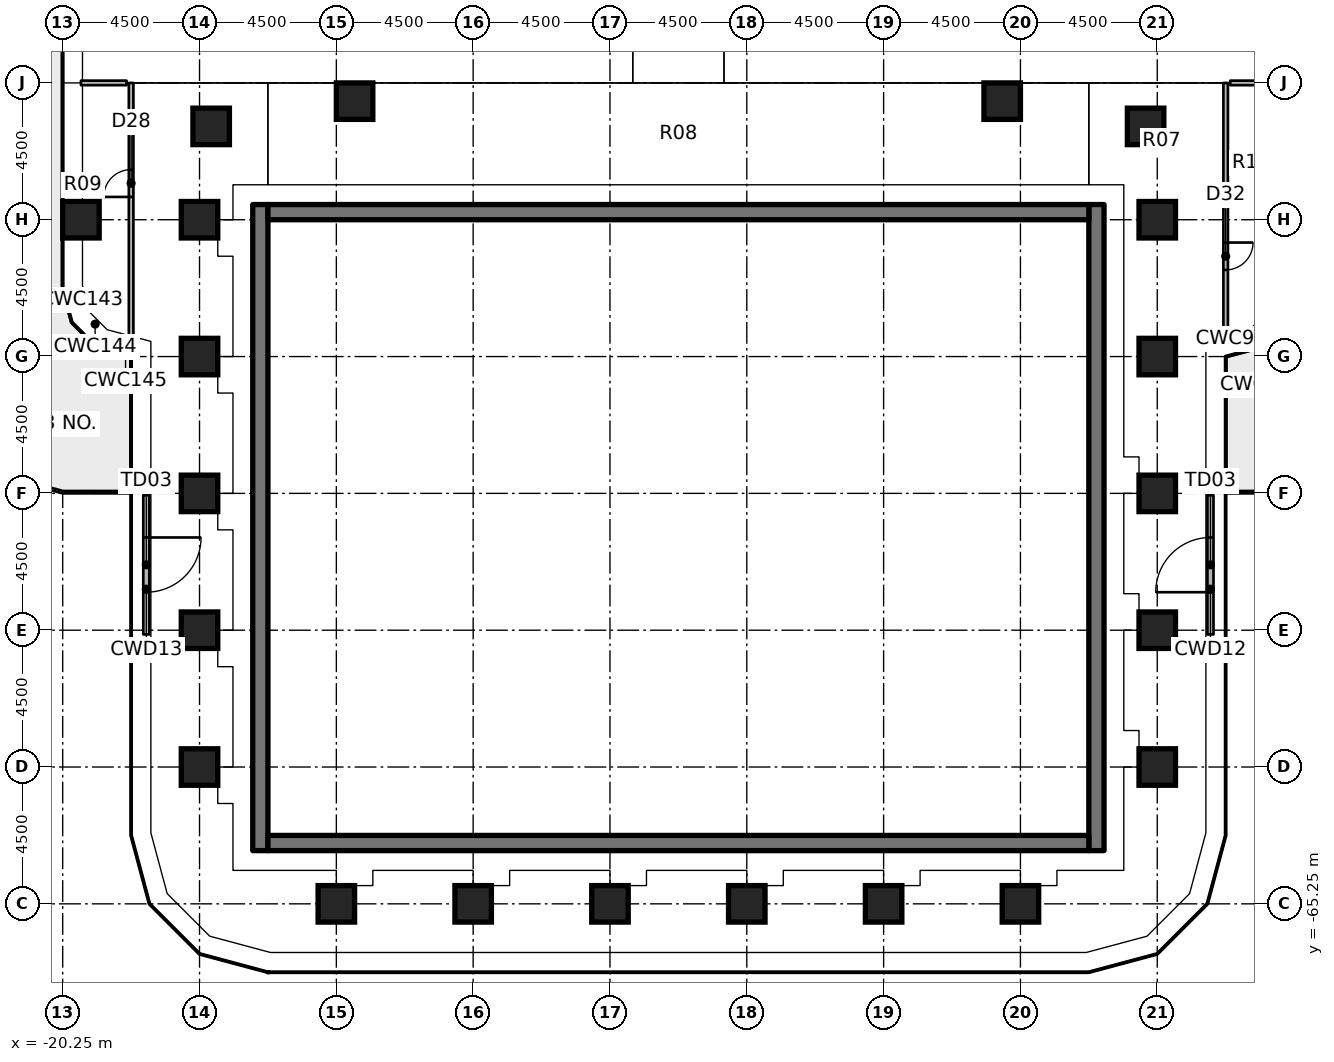
"""IFC4 building model, lengths in metres.
Left out: names, types, materials, properties, quantities, classifications, styles, units other than length and angle.
Written with IfcOpenShell. Run it as: python <this file> out.ifc"""

import sys

from ifc_helpers import new_model, si_unit, direction, frame, frame_2d, origin, origin_2d, place, context, subcontext, project, spatial, rectangle, extrude, element, fill, save


model = new_model("IFC4")
c1 = context("Model", 3, precision=1e-05, world=origin(), true_north=direction((0.0, 1.0)))
c2 = subcontext(c1, "Body", "Model", "MODEL_VIEW")
j1 = project(units=[si_unit("LENGTHUNIT", "METRE"), si_unit("PLANEANGLEUNIT", "RADIAN")], contexts=[c1])
p1 = place(None, origin())
s1 = spatial("IfcSite", under=j1, at=p1, CompositionType="ELEMENT")
p2 = place(p1, origin())
s2 = spatial("IfcBuilding", under=s1, at=p2, CompositionType="ELEMENT")
p3 = place(p2, frame((0.0, 0.0, 12.0)))
s3 = spatial("IfcBuildingStorey", under=s2, at=p3, CompositionType="ELEMENT", Elevation=12.0)
for number, where, z_axis, x_axis in (
    (1, (-19.65, -42.75, 0.0), (0.0, 0.0, 1.0), (1.0, 0.0, 0.0)),
    (2, (-15.75, -60.75, 0.0), (0.0, 0.0, 1.0), (1.0, 0.0, 0.0)),
    (3, (-15.75, -56.25, 0.0), (0.0, 0.0, 1.0), (1.0, 0.0, 0.0)),
    (4, (-15.75, -51.75, 0.0), (0.0, 0.0, 1.0), (1.0, 0.0, 0.0)),
    (5, (-15.75, -47.25, 0.0), (0.0, 0.0, 1.0), (1.0, 0.0, 0.0)),
    (6, (-15.75, -42.75, 0.0), (0.0, 0.0, 1.0), (1.0, 0.0, 0.0)),
    (7, (-15.367, -39.68, 0.0), (0.0, 0.0, 1.0), (1.0, 0.0, 0.0)),
    (8, (-11.25, -65.25, 0.0), (0.0, 0.0, 1.0), (1.0, 0.0, 0.0)),
    (9, (-10.65, -38.85, 0.0), (0.0, 0.0, 1.0), (1.0, 0.0, 0.0)),
    (10, (-6.75, -65.25, 0.0), (0.0, 0.0, 1.0), (1.0, 0.0, 0.0)),
    (11, (-2.25, -65.25, 0.0), (0.0, 0.0, 1.0), (1.0, 0.0, 0.0)),
    (12, (2.25, -65.25, 0.0), (0.0, 0.0, 1.0), (1.0, 0.0, 0.0)),
    (13, (6.75, -65.25, 0.0), (0.0, 0.0, 1.0), (1.0, 0.0, 0.0)),
    (14, (11.25, -65.25, 0.0), (0.0, 0.0, 1.0), (1.0, 0.0, 0.0)),
    (15, (10.65, -38.85, 0.0), (0.0, 0.0, 1.0), (1.0, 0.0, 0.0)),
    (16, (15.75, -60.75, 0.0), (0.0, 0.0, 1.0), (1.0, 0.0, 0.0)),
    (17, (15.75, -56.25, 0.0), (0.0, 0.0, 1.0), (1.0, 0.0, 0.0)),
    (18, (15.75, -51.75, 0.0), (0.0, 0.0, 1.0), (1.0, 0.0, 0.0)),
    (19, (15.75, -47.25, 0.0), (0.0, 0.0, 1.0), (1.0, 0.0, 0.0)),
    (20, (15.75, -42.75, 0.0), (0.0, 0.0, 1.0), (1.0, 0.0, 0.0)),
    (21, (15.367, -39.68, 0.0), (0.0, 0.0, 1.0), (1.0, 0.0, 0.0)),
):
    element("IfcColumn", number, at=place(p3, frame(where, z_axis=z_axis, x_axis=x_axis)), inside=s3, PredefinedType="COLUMN", context=c2, shape_type="SweptSolid", body=[
        extrude(rectangle(XDim=1.2, YDim=1.2, at=origin_2d()), origin(), (0.0, 0.0, 1.0), 4.55),
    ])
for number, where, z_axis, x_axis in (
    (22, (-13.75, -63.5, 0.0), (0.0, 0.0, 1.0), (0.0, 1.0, 0.0)),
    (23, (13.75, -63.5, 0.0), (0.0, 0.0, 1.0), (0.0, 1.0, 0.0)),
):
    element("IfcWall", number, at=place(p3, frame(where, z_axis=z_axis, x_axis=x_axis)), inside=s3, PredefinedType="SOLIDWALL", context=c2, shape_type="SweptSolid", body=[
        extrude(rectangle(XDim=21.25, YDim=0.5, at=frame_2d((10.625, 0.0))), origin(), (0.0, 0.0, 1.0), 5.0),
    ])
for number, where, z_axis, x_axis in (
    (24, (-13.5, -63.25, 0.0), (0.0, 0.0, 1.0), (1.0, 0.0, 0.0)),
    (25, (-13.5, -42.5, 0.0), (0.0, 0.0, 1.0), (1.0, 0.0, 0.0)),
):
    element("IfcWall", number, at=place(p3, frame(where, z_axis=z_axis, x_axis=x_axis)), inside=s3, PredefinedType="SOLIDWALL", context=c2, shape_type="SweptSolid", body=[
        extrude(rectangle(XDim=27.0, YDim=0.5, at=frame_2d((13.5, 0.0))), origin(), (0.0, 0.0, 1.0), 5.0),
    ])
p4 = place(p3, frame((17.5, -56.39, 0.0), z_axis=(0.0, 0.0, 1.0), x_axis=(0.0, 1.0, 0.0)))
e26 = element("IfcWall", 26, at=p4, inside=s3, PredefinedType="SOLIDWALL", context=c2, shape_type="SweptSolid", body=[
    extrude(rectangle(XDim=4.58, YDim=0.2, at=frame_2d((2.29, 0.0))), origin(), (0.0, 0.0, 1.0), 4.55),
])
p5 = place(p4, frame((1.39, 0.0, 0.0)))
e27 = element("IfcOpeningElement", 27, at=p5, cuts=e26, PredefinedType="OPENING", context=c2, shape_type="SweptSolid", body=[
    extrude(rectangle(XDim=1.8, YDim=2.4, at=frame_2d((0.9, 1.2))), frame((0.0, 0.11, 0.0), z_axis=(0.0, -1.0, 0.0), x_axis=(1.0, 0.0, 0.0)), (0.0, 0.0, 1.0), 0.22),
])
p6 = place(p3, frame((-17.5, -51.81, 0.0), z_axis=(0.0, 0.0, 1.0), x_axis=(0.0, -1.0, 0.0)))
e28 = element("IfcWall", 28, at=p6, inside=s3, PredefinedType="SOLIDWALL", context=c2, shape_type="SweptSolid", body=[
    extrude(rectangle(XDim=4.58, YDim=0.2, at=frame_2d((2.29, 0.0))), origin(), (0.0, 0.0, 1.0), 4.55),
])
p7 = place(p6, frame((1.39, 0.0, 0.0)))
e29 = element("IfcOpeningElement", 29, at=p7, cuts=e28, PredefinedType="OPENING", context=c2, shape_type="SweptSolid", body=[
    extrude(rectangle(XDim=1.8, YDim=2.4, at=frame_2d((0.9, 1.2))), frame((0.0, 0.11, 0.0), z_axis=(0.0, -1.0, 0.0), x_axis=(1.0, 0.0, 0.0)), (0.0, 0.0, 1.0), 0.22),
])
p8 = place(p3, frame((-18.0, -46.63, 0.0), z_axis=(0.0, 0.0, 1.0), x_axis=(0.0, 1.0, 0.0)))
e30 = element("IfcWall", 30, at=p8, inside=s3, PredefinedType="PARTITIONING", context=c2, shape_type="SweptSolid", body=[
    extrude(rectangle(XDim=8.38, YDim=0.15, at=frame_2d((4.19, 0.0))), origin(), (0.0, 0.0, 1.0), 4.55),
])
p9 = place(p8, frame((4.63, 0.0, 0.0)))
e31 = element("IfcOpeningElement", 31, at=p9, cuts=e30, PredefinedType="OPENING", context=c2, shape_type="SweptSolid", body=[
    extrude(rectangle(XDim=0.9, YDim=2.1, at=frame_2d((0.45, 1.05))), frame((0.0, 0.085, 0.0), z_axis=(0.0, -1.0, 0.0), x_axis=(1.0, 0.0, 0.0)), (0.0, 0.0, 1.0), 0.17),
])
p10 = place(p3, frame((18.0, -38.25, 0.0), z_axis=(0.0, 0.0, 1.0), x_axis=(0.0, -1.0, 0.0)))
e32 = element("IfcWall", 32, at=p10, inside=s3, PredefinedType="PARTITIONING", context=c2, shape_type="SweptSolid", body=[
    extrude(rectangle(XDim=8.38, YDim=0.15, at=frame_2d((4.19, 0.0))), origin(), (0.0, 0.0, 1.0), 4.55),
])
p11 = place(p10, frame((5.25, 0.0, 0.0)))
e33 = element("IfcOpeningElement", 33, at=p11, cuts=e32, PredefinedType="OPENING", context=c2, shape_type="SweptSolid", body=[
    extrude(rectangle(XDim=0.9, YDim=2.1, at=frame_2d((0.45, 1.05))), frame((0.0, 0.085, 0.0), z_axis=(0.0, -1.0, 0.0), x_axis=(1.0, 0.0, 0.0)), (0.0, 0.0, 1.0), 0.17),
])
for number, where, z_axis, x_axis in (
    (34, (-19.65, -38.25, 0.0), (0.0, 0.0, 1.0), (1.0, 0.0, 0.0)),
    (35, (18.15, -38.25, 0.0), (0.0, 0.0, 1.0), (1.0, 0.0, 0.0)),
):
    element("IfcWall", number, at=place(p3, frame(where, z_axis=z_axis, x_axis=x_axis)), inside=s3, PredefinedType="PARTITIONING", context=c2, shape_type="SweptSolid", body=[
        extrude(rectangle(XDim=1.5, YDim=0.15, at=frame_2d((0.75, 0.0))), origin(), (0.0, 0.0, 1.0), 4.55),
    ])
p12 = place(p5, origin())
e36 = element("IfcDoor", 36, at=p12, inside=s3, OperationType="SINGLE_SWING_LEFT", PredefinedType="DOOR", context=c2, shape_type="SweptSolid", body=[
    extrude(rectangle(XDim=1.8, YDim=2.4, at=frame_2d((0.9, 1.2))), frame((0.0, 0.025, 0.0), z_axis=(0.0, -1.0, 0.0), x_axis=(1.0, 0.0, 0.0)), (0.0, 0.0, 1.0), 0.05),
])
fill(e27, e36)
p13 = place(p7, origin())
e37 = element("IfcDoor", 37, at=p13, inside=s3, OperationType="SINGLE_SWING_LEFT", PredefinedType="DOOR", context=c2, shape_type="SweptSolid", body=[
    extrude(rectangle(XDim=1.8, YDim=2.4, at=frame_2d((0.9, 1.2))), frame((0.0, 0.025, 0.0), z_axis=(0.0, -1.0, 0.0), x_axis=(1.0, 0.0, 0.0)), (0.0, 0.0, 1.0), 0.05),
])
fill(e29, e37)
p14 = place(p9, origin())
e38 = element("IfcDoor", 38, at=p14, inside=s3, OperationType="SINGLE_SWING_LEFT", PredefinedType="DOOR", context=c2, shape_type="SweptSolid", body=[
    extrude(rectangle(XDim=0.9, YDim=2.1, at=frame_2d((0.45, 1.05))), frame((0.0, 0.025, 0.0), z_axis=(0.0, -1.0, 0.0), x_axis=(1.0, 0.0, 0.0)), (0.0, 0.0, 1.0), 0.05),
])
fill(e31, e38)
p15 = place(p11, origin())
e39 = element("IfcDoor", 39, at=p15, inside=s3, OperationType="SINGLE_SWING_LEFT", PredefinedType="DOOR", context=c2, shape_type="SweptSolid", body=[
    extrude(rectangle(XDim=0.9, YDim=2.1, at=frame_2d((0.45, 1.05))), frame((0.0, 0.025, 0.0), z_axis=(0.0, -1.0, 0.0), x_axis=(1.0, 0.0, 0.0)), (0.0, 0.0, 1.0), 0.05),
])
fill(e33, e39)
save(model, sys.argv[1])
